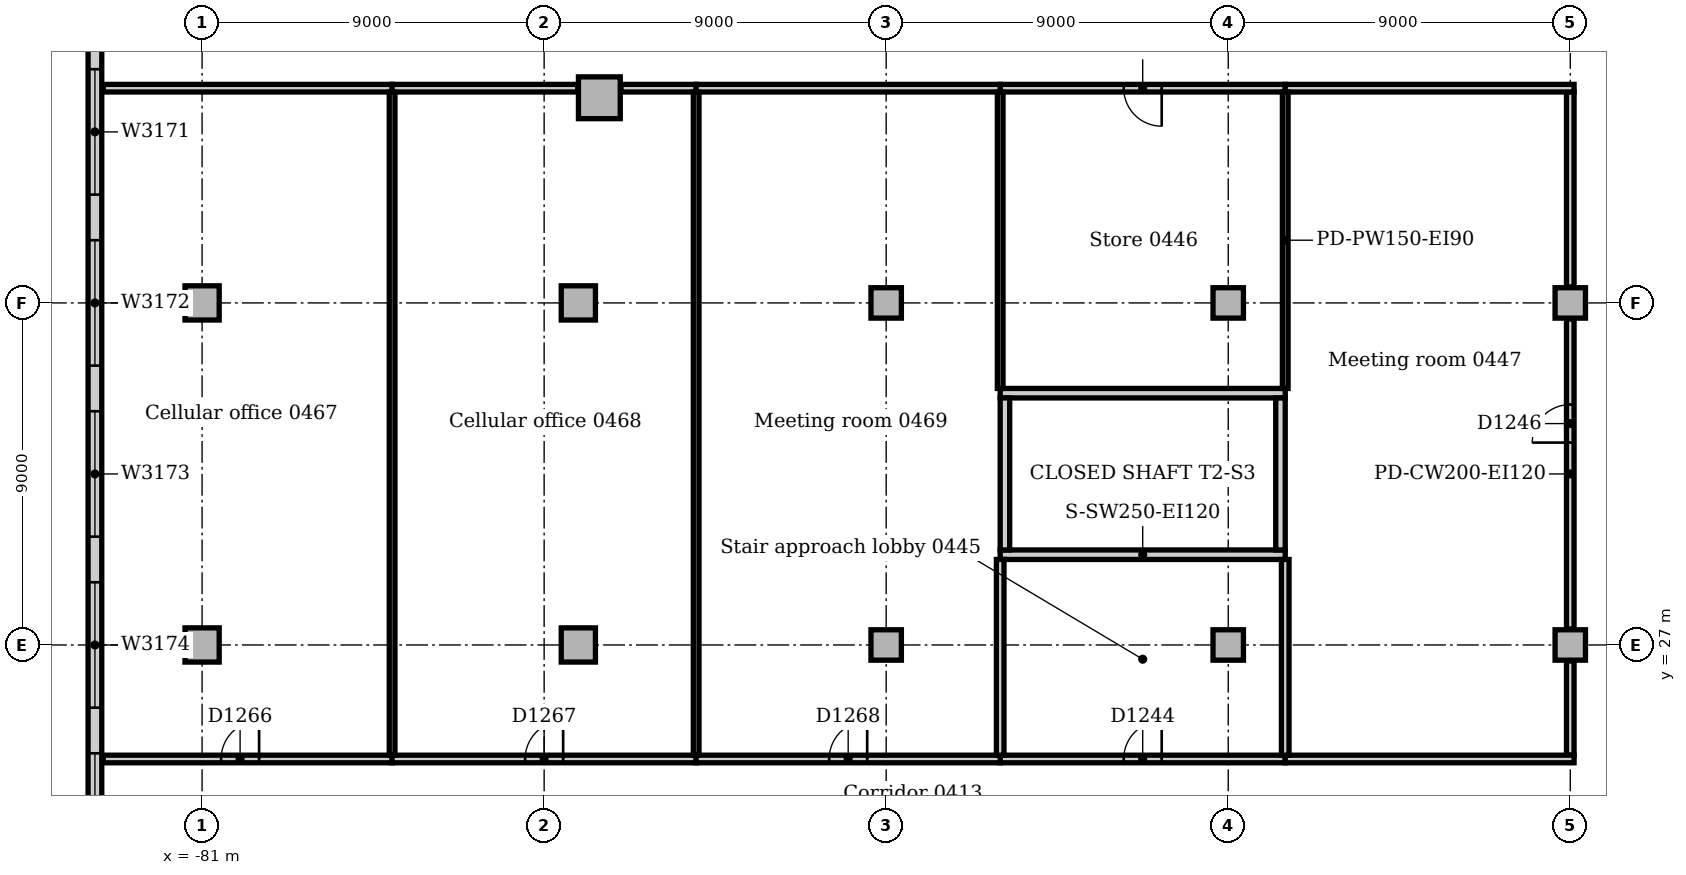
"""IFC4 building model, lengths in metres.
Left out: names, types, materials, properties, quantities, classifications, styles, units other than length and angle.
Written with IfcOpenShell. Run it as: python <this file> out.ifc"""

import sys

from ifc_helpers import new_model, si_unit, direction, frame, frame_2d, origin, origin_2d, place, context, subcontext, project, spatial, rectangle, extrude, element, fill, save


model = new_model("IFC4")
c1 = context("Model", 3, precision=1e-05, world=origin(), true_north=direction((0.0, 1.0)))
c2 = subcontext(c1, "Body", "Model", "MODEL_VIEW")
j1 = project(units=[si_unit("LENGTHUNIT", "METRE"), si_unit("PLANEANGLEUNIT", "RADIAN")], contexts=[c1])
p1 = place(None, origin())
s1 = spatial("IfcSite", under=j1, at=p1, CompositionType="ELEMENT")
p2 = place(p1, origin())
s2 = spatial("IfcBuilding", under=s1, at=p2, CompositionType="ELEMENT")
p3 = place(p2, frame((0.0, 0.0, 21.0)))
s3 = spatial("IfcBuildingStorey", under=s2, at=p3, CompositionType="ELEMENT", Elevation=21.0)
for number, where, z_axis, x_axis in (
    (1, (-60.0, 29.375, 0.0), (0.0, 0.0, 1.0), (1.0, 0.0, 0.0)),
    (2, (-52.5, 33.625, 0.0), (0.0, 0.0, 1.0), (-1.0, 0.0, 0.0)),
):
    element("IfcWall", number, at=place(p3, frame(where, z_axis=z_axis, x_axis=x_axis)), inside=s3, PredefinedType="SOLIDWALL", context=c2, shape_type="SweptSolid", body=[
        extrude(rectangle(XDim=7.5, YDim=0.25, at=frame_2d((3.75, 0.0))), origin(), (0.0, 0.0, 1.0), 5.0),
    ])
for number, where, z_axis, x_axis in (
    (3, (-52.625, 29.5, 0.0), (0.0, 0.0, 1.0), (0.0, 1.0, 0.0)),
    (4, (-59.875, 33.5, 0.0), (0.0, 0.0, 1.0), (0.0, -1.0, 0.0)),
):
    element("IfcWall", number, at=place(p3, frame(where, z_axis=z_axis, x_axis=x_axis)), inside=s3, PredefinedType="SOLIDWALL", context=c2, shape_type="SweptSolid", body=[
        extrude(rectangle(XDim=4.0, YDim=0.25, at=frame_2d((2.0, 0.0))), origin(), (0.0, 0.0, 1.0), 5.0),
    ])
p4 = place(p3, frame((-70.547, 41.398, 0.0), z_axis=(0.0, 0.0, 1.0), x_axis=(1.0, 0.0, 0.0)))
e5 = element("IfcColumn", 5, at=p4, inside=s3, PredefinedType="COLUMN", context=c2, shape_type="SweptSolid", body=[
    extrude(rectangle(XDim=1.1, YDim=1.1, at=origin_2d()), origin(), (0.0, 0.0, 1.0), 4.85),
])
for number, where, z_axis, x_axis in (
    (6, (-71.1, 27.0, 0.0), (0.0, 0.0, 1.0), (1.0, 0.0, 0.0)),
    (7, (-71.1, 36.0, 0.0), (0.0, 0.0, 1.0), (1.0, 0.0, 0.0)),
):
    element("IfcColumn", number, at=place(p3, frame(where, z_axis=z_axis, x_axis=x_axis)), inside=s3, PredefinedType="COLUMN", context=c2, shape_type="SweptSolid", body=[
        extrude(rectangle(XDim=0.9, YDim=0.9, at=origin_2d()), origin(), (0.0, 0.0, 1.0), 4.85),
    ])
for number, where, z_axis, x_axis in (
    (8, (-63.0, 27.0, 0.0), (0.0, 0.0, 1.0), (1.0, 0.0, 0.0)),
    (9, (-63.0, 36.0, 0.0), (0.0, 0.0, 1.0), (1.0, 0.0, 0.0)),
    (10, (-54.0, 27.0, 0.0), (0.0, 0.0, 1.0), (1.0, 0.0, 0.0)),
    (11, (-54.0, 36.0, 0.0), (0.0, 0.0, 1.0), (1.0, 0.0, 0.0)),
    (12, (-45.0, 27.0, 0.0), (0.0, 0.0, 1.0), (1.0, 0.0, 0.0)),
    (13, (-45.0, 36.0, 0.0), (0.0, 0.0, 1.0), (1.0, 0.0, 0.0)),
):
    element("IfcColumn", number, at=place(p3, frame(where, z_axis=z_axis, x_axis=x_axis)), inside=s3, PredefinedType="COLUMN", context=c2, shape_type="SweptSolid", body=[
        extrude(rectangle(XDim=0.8, YDim=0.8, at=origin_2d()), origin(), (0.0, 0.0, 1.0), 4.85),
    ])
for number, where, z_axis, x_axis in (
    (14, (-81.0, 27.0, 0.0), (0.0, 0.0, 1.0), (1.0, 0.0, 0.0)),
    (15, (-81.0, 36.0, 0.0), (0.0, 0.0, 1.0), (1.0, 0.0, 0.0)),
):
    element("IfcColumn", number, at=place(p3, frame(where, z_axis=z_axis, x_axis=x_axis)), inside=s3, PredefinedType="COLUMN", context=c2, shape_type="SweptSolid", body=[
        extrude(rectangle(XDim=0.9, YDim=0.9, at=origin_2d()), origin(), (0.0, 0.0, 1.0), 4.7),
    ])
p5 = place(p3, frame((-83.82, 54.0, 0.0), z_axis=(0.0, 0.0, 1.0), x_axis=(0.0, -1.0, 0.0)))
e16 = element("IfcWall", 16, at=p5, inside=s3, PredefinedType="STANDARD", context=c2, shape_type="SweptSolid", body=[
    extrude(rectangle(XDim=63.0, YDim=0.36, at=frame_2d((31.5, 0.0))), origin(), (0.0, 0.0, 1.0), 4.85),
])
p6 = place(p5, frame((2.85, 0.0, 0.9)))
e17 = element("IfcOpeningElement", 17, at=p6, cuts=e16, PredefinedType="OPENING", context=c2, shape_type="SweptSolid", body=[
    extrude(rectangle(XDim=3.3, YDim=2.4, at=frame_2d((1.65, 1.2))), frame((0.0, 0.19, 0.0), z_axis=(0.0, -1.0, 0.0), x_axis=(1.0, 0.0, 0.0)), (0.0, 0.0, 1.0), 0.38),
])
p7 = place(p5, frame((7.35, 0.0, 0.9)))
e18 = element("IfcOpeningElement", 18, at=p7, cuts=e16, PredefinedType="OPENING", context=c2, shape_type="SweptSolid", body=[
    extrude(rectangle(XDim=3.3, YDim=2.4, at=frame_2d((1.65, 1.2))), frame((0.0, 0.19, 0.0), z_axis=(0.0, -1.0, 0.0), x_axis=(1.0, 0.0, 0.0)), (0.0, 0.0, 1.0), 0.38),
])
p8 = place(p5, frame((11.85, 0.0, 0.9)))
e19 = element("IfcOpeningElement", 19, at=p8, cuts=e16, PredefinedType="OPENING", context=c2, shape_type="SweptSolid", body=[
    extrude(rectangle(XDim=3.3, YDim=2.4, at=frame_2d((1.65, 1.2))), frame((0.0, 0.19, 0.0), z_axis=(0.0, -1.0, 0.0), x_axis=(1.0, 0.0, 0.0)), (0.0, 0.0, 1.0), 0.38),
])
p9 = place(p5, frame((16.35, 0.0, 0.9)))
e20 = element("IfcOpeningElement", 20, at=p9, cuts=e16, PredefinedType="OPENING", context=c2, shape_type="SweptSolid", body=[
    extrude(rectangle(XDim=3.3, YDim=2.4, at=frame_2d((1.65, 1.2))), frame((0.0, 0.19, 0.0), z_axis=(0.0, -1.0, 0.0), x_axis=(1.0, 0.0, 0.0)), (0.0, 0.0, 1.0), 0.38),
])
p10 = place(p5, frame((20.85, 0.0, 0.9)))
e21 = element("IfcOpeningElement", 21, at=p10, cuts=e16, PredefinedType="OPENING", context=c2, shape_type="SweptSolid", body=[
    extrude(rectangle(XDim=3.3, YDim=2.4, at=frame_2d((1.65, 1.2))), frame((0.0, 0.19, 0.0), z_axis=(0.0, -1.0, 0.0), x_axis=(1.0, 0.0, 0.0)), (0.0, 0.0, 1.0), 0.38),
])
p11 = place(p5, frame((25.35, 0.0, 0.9)))
e22 = element("IfcOpeningElement", 22, at=p11, cuts=e16, PredefinedType="OPENING", context=c2, shape_type="SweptSolid", body=[
    extrude(rectangle(XDim=3.3, YDim=2.4, at=frame_2d((1.65, 1.2))), frame((0.0, 0.19, 0.0), z_axis=(0.0, -1.0, 0.0), x_axis=(1.0, 0.0, 0.0)), (0.0, 0.0, 1.0), 0.38),
])
p12 = place(p5, frame((29.85, 0.0, 0.9)))
e23 = element("IfcOpeningElement", 23, at=p12, cuts=e16, PredefinedType="OPENING", context=c2, shape_type="SweptSolid", body=[
    extrude(rectangle(XDim=3.3, YDim=2.4, at=frame_2d((1.65, 1.2))), frame((0.0, 0.19, 0.0), z_axis=(0.0, -1.0, 0.0), x_axis=(1.0, 0.0, 0.0)), (0.0, 0.0, 1.0), 0.38),
])
p13 = place(p5, frame((34.35, 0.0, 0.9)))
e24 = element("IfcOpeningElement", 24, at=p13, cuts=e16, PredefinedType="OPENING", context=c2, shape_type="SweptSolid", body=[
    extrude(rectangle(XDim=3.3, YDim=2.4, at=frame_2d((1.65, 1.2))), frame((0.0, 0.19, 0.0), z_axis=(0.0, -1.0, 0.0), x_axis=(1.0, 0.0, 0.0)), (0.0, 0.0, 1.0), 0.38),
])
p14 = place(p5, frame((38.85, 0.0, 0.9)))
e25 = element("IfcOpeningElement", 25, at=p14, cuts=e16, PredefinedType="OPENING", context=c2, shape_type="SweptSolid", body=[
    extrude(rectangle(XDim=3.3, YDim=2.4, at=frame_2d((1.65, 1.2))), frame((0.0, 0.19, 0.0), z_axis=(0.0, -1.0, 0.0), x_axis=(1.0, 0.0, 0.0)), (0.0, 0.0, 1.0), 0.38),
])
p15 = place(p5, frame((43.35, 0.0, 0.9)))
e26 = element("IfcOpeningElement", 26, at=p15, cuts=e16, PredefinedType="OPENING", context=c2, shape_type="SweptSolid", body=[
    extrude(rectangle(XDim=3.3, YDim=2.4, at=frame_2d((1.65, 1.2))), frame((0.0, 0.19, 0.0), z_axis=(0.0, -1.0, 0.0), x_axis=(1.0, 0.0, 0.0)), (0.0, 0.0, 1.0), 0.38),
])
p16 = place(p5, frame((47.85, 0.0, 0.9)))
e27 = element("IfcOpeningElement", 27, at=p16, cuts=e16, PredefinedType="OPENING", context=c2, shape_type="SweptSolid", body=[
    extrude(rectangle(XDim=3.3, YDim=2.4, at=frame_2d((1.65, 1.2))), frame((0.0, 0.19, 0.0), z_axis=(0.0, -1.0, 0.0), x_axis=(1.0, 0.0, 0.0)), (0.0, 0.0, 1.0), 0.38),
])
p17 = place(p5, frame((52.35, 0.0, 0.9)))
e28 = element("IfcOpeningElement", 28, at=p17, cuts=e16, PredefinedType="OPENING", context=c2, shape_type="SweptSolid", body=[
    extrude(rectangle(XDim=3.3, YDim=2.4, at=frame_2d((1.65, 1.2))), frame((0.0, 0.19, 0.0), z_axis=(0.0, -1.0, 0.0), x_axis=(1.0, 0.0, 0.0)), (0.0, 0.0, 1.0), 0.38),
])
p18 = place(p5, frame((56.85, 0.0, 0.9)))
e29 = element("IfcOpeningElement", 29, at=p18, cuts=e16, PredefinedType="OPENING", context=c2, shape_type="SweptSolid", body=[
    extrude(rectangle(XDim=3.3, YDim=2.4, at=frame_2d((1.65, 1.2))), frame((0.0, 0.19, 0.0), z_axis=(0.0, -1.0, 0.0), x_axis=(1.0, 0.0, 0.0)), (0.0, 0.0, 1.0), 0.38),
])
p19 = place(p3, frame((-45.0, 24.1, 0.0), z_axis=(0.0, 0.0, 1.0), x_axis=(0.0, 1.0, 0.0)))
e30 = element("IfcWall", 30, at=p19, inside=s3, PredefinedType="PARTITIONING", context=c2, shape_type="SweptSolid", body=[
    extrude(rectangle(XDim=2.48, YDim=0.2, at=frame_2d((1.24, 0.0))), origin(), (0.0, 0.0, 1.0), 4.158),
])
p20 = place(p3, frame((-45.0, 27.42, 0.0), z_axis=(0.0, 0.0, 1.0), x_axis=(0.0, 1.0, 0.0)))
e31 = element("IfcWall", 31, at=p20, inside=s3, PredefinedType="PARTITIONING", context=c2, shape_type="SweptSolid", body=[
    extrude(rectangle(XDim=8.16, YDim=0.2, at=frame_2d((4.08, 0.0))), origin(), (0.0, 0.0, 1.0), 4.158),
])
p21 = place(p20, frame((4.905, 0.0, 0.0)))
e32 = element("IfcOpeningElement", 32, at=p21, cuts=e31, PredefinedType="OPENING", context=c2, shape_type="SweptSolid", body=[
    extrude(rectangle(XDim=1.0, YDim=2.1, at=frame_2d((0.5, 1.05))), frame((0.0, 0.11, 0.0), z_axis=(0.0, -1.0, 0.0), x_axis=(1.0, 0.0, 0.0)), (0.0, 0.0, 1.0), 0.22),
])
p22 = place(p3, frame((-45.0, 36.42, 0.0), z_axis=(0.0, 0.0, 1.0), x_axis=(0.0, 1.0, 0.0)))
e33 = element("IfcWall", 33, at=p22, inside=s3, PredefinedType="PARTITIONING", context=c2, shape_type="SweptSolid", body=[
    extrude(rectangle(XDim=5.13, YDim=0.2, at=frame_2d((2.565, 0.0))), origin(), (0.0, 0.0, 1.0), 4.158),
])
p23 = place(p3, frame((-60.0, 24.0, 0.0), z_axis=(0.0, 0.0, 1.0), x_axis=(1.0, 0.0, 0.0)))
e34 = element("IfcWall", 34, at=p23, inside=s3, PredefinedType="PARTITIONING", context=c2, shape_type="SweptSolid", body=[
    extrude(rectangle(XDim=7.5, YDim=0.2, at=frame_2d((3.75, 0.0))), origin(), (0.0, 0.0, 1.0), 4.85),
])
p24 = place(p23, frame((3.25, 0.0, 0.0)))
e35 = element("IfcOpeningElement", 35, at=p24, cuts=e34, PredefinedType="OPENING", context=c2, shape_type="SweptSolid", body=[
    extrude(rectangle(XDim=1.0, YDim=2.1, at=frame_2d((0.5, 1.05))), frame((0.0, 0.11, 0.0), z_axis=(0.0, -1.0, 0.0), x_axis=(1.0, 0.0, 0.0)), (0.0, 0.0, 1.0), 0.22),
])
p25 = place(p3, frame((-52.5, 24.0, 0.0), z_axis=(0.0, 0.0, 1.0), x_axis=(1.0, 0.0, 0.0)))
e36 = element("IfcWall", 36, at=p25, inside=s3, PredefinedType="PARTITIONING", context=c2, shape_type="SweptSolid", body=[
    extrude(rectangle(XDim=7.6, YDim=0.2, at=frame_2d((3.8, 0.0))), origin(), (0.0, 0.0, 1.0), 4.85),
])
p26 = place(p3, frame((-83.6, 24.0, 0.0), z_axis=(0.0, 0.0, 1.0), x_axis=(1.0, 0.0, 0.0)))
e37 = element("IfcWall", 37, at=p26, inside=s3, PredefinedType="PARTITIONING", context=c2, shape_type="SweptSolid", body=[
    extrude(rectangle(XDim=7.6, YDim=0.2, at=frame_2d((3.8, 0.0))), origin(), (0.0, 0.0, 1.0), 4.7),
])
p27 = place(p26, frame((3.1, 0.0, 0.0)))
e38 = element("IfcOpeningElement", 38, at=p27, cuts=e37, PredefinedType="OPENING", context=c2, shape_type="SweptSolid", body=[
    extrude(rectangle(XDim=1.0, YDim=2.1, at=frame_2d((0.5, 1.05))), frame((0.0, 0.11, 0.0), z_axis=(0.0, -1.0, 0.0), x_axis=(1.0, 0.0, 0.0)), (0.0, 0.0, 1.0), 0.22),
])
p28 = place(p3, frame((-76.0, 24.0, 0.0), z_axis=(0.0, 0.0, 1.0), x_axis=(1.0, 0.0, 0.0)))
e39 = element("IfcWall", 39, at=p28, inside=s3, PredefinedType="PARTITIONING", context=c2, shape_type="SweptSolid", body=[
    extrude(rectangle(XDim=8.0, YDim=0.2, at=frame_2d((4.0, 0.0))), origin(), (0.0, 0.0, 1.0), 4.7),
])
p29 = place(p28, frame((3.5, 0.0, 0.0)))
e40 = element("IfcOpeningElement", 40, at=p29, cuts=e39, PredefinedType="OPENING", context=c2, shape_type="SweptSolid", body=[
    extrude(rectangle(XDim=1.0, YDim=2.1, at=frame_2d((0.5, 1.05))), frame((0.0, 0.11, 0.0), z_axis=(0.0, -1.0, 0.0), x_axis=(1.0, 0.0, 0.0)), (0.0, 0.0, 1.0), 0.22),
])
p30 = place(p3, frame((-68.0, 24.0, 0.0), z_axis=(0.0, 0.0, 1.0), x_axis=(1.0, 0.0, 0.0)))
e41 = element("IfcWall", 41, at=p30, inside=s3, PredefinedType="PARTITIONING", context=c2, shape_type="SweptSolid", body=[
    extrude(rectangle(XDim=8.0, YDim=0.2, at=frame_2d((4.0, 0.0))), origin(), (0.0, 0.0, 1.0), 4.85),
])
p31 = place(p30, frame((3.5, 0.0, 0.0)))
e42 = element("IfcOpeningElement", 42, at=p31, cuts=e41, PredefinedType="OPENING", context=c2, shape_type="SweptSolid", body=[
    extrude(rectangle(XDim=1.0, YDim=2.1, at=frame_2d((0.5, 1.05))), frame((0.0, 0.11, 0.0), z_axis=(0.0, -1.0, 0.0), x_axis=(1.0, 0.0, 0.0)), (0.0, 0.0, 1.0), 0.22),
])
p32 = place(p3, frame((-60.0, 41.65, 0.0), z_axis=(0.0, 0.0, 1.0), x_axis=(1.0, 0.0, 0.0)))
e43 = element("IfcWall", 43, at=p32, inside=s3, PredefinedType="PARTITIONING", context=c2, shape_type="SweptSolid", body=[
    extrude(rectangle(XDim=7.5, YDim=0.2, at=frame_2d((3.75, 0.0))), origin(), (0.0, 0.0, 1.0), 4.85),
])
p33 = place(p32, frame((3.25, 0.0, 0.0)))
e44 = element("IfcOpeningElement", 44, at=p33, cuts=e43, PredefinedType="OPENING", context=c2, shape_type="SweptSolid", body=[
    extrude(rectangle(XDim=1.0, YDim=2.1, at=frame_2d((0.5, 1.05))), frame((0.0, 0.11, 0.0), z_axis=(0.0, -1.0, 0.0), x_axis=(1.0, 0.0, 0.0)), (0.0, 0.0, 1.0), 0.22),
])
p34 = place(p3, frame((-52.5, 41.65, 0.0), z_axis=(0.0, 0.0, 1.0), x_axis=(1.0, 0.0, 0.0)))
e45 = element("IfcWall", 45, at=p34, inside=s3, PredefinedType="PARTITIONING", context=c2, shape_type="SweptSolid", body=[
    extrude(rectangle(XDim=7.6, YDim=0.2, at=frame_2d((3.8, 0.0))), origin(), (0.0, 0.0, 1.0), 4.85),
])
p35 = place(p3, frame((-83.6, 41.65, 0.0), z_axis=(0.0, 0.0, 1.0), x_axis=(1.0, 0.0, 0.0)))
e46 = element("IfcWall", 46, at=p35, inside=s3, PredefinedType="PARTITIONING", context=c2, shape_type="SweptSolid", body=[
    extrude(rectangle(XDim=7.6, YDim=0.2, at=frame_2d((3.8, 0.0))), origin(), (0.0, 0.0, 1.0), 4.7),
])
p36 = place(p3, frame((-76.0, 41.65, 0.0), z_axis=(0.0, 0.0, 1.0), x_axis=(1.0, 0.0, 0.0)))
e47 = element("IfcWall", 47, at=p36, inside=s3, PredefinedType="PARTITIONING", context=c2, shape_type="SweptSolid", body=[
    extrude(rectangle(XDim=4.883, YDim=0.2, at=frame_2d((2.442, 0.0))), origin(), (0.0, 0.0, 1.0), 4.7),
])
p37 = place(p3, frame((-69.977, 41.65, 0.0), z_axis=(0.0, 0.0, 1.0), x_axis=(1.0, 0.0, 0.0)))
e48 = element("IfcWall", 48, at=p37, inside=s3, PredefinedType="PARTITIONING", context=c2, shape_type="SweptSolid", body=[
    extrude(rectangle(XDim=1.977, YDim=0.2, at=frame_2d((0.989, 0.0))), origin(), (0.0, 0.0, 1.0), 4.85),
])
p38 = place(p3, frame((-68.0, 41.65, 0.0), z_axis=(0.0, 0.0, 1.0), x_axis=(1.0, 0.0, 0.0)))
e49 = element("IfcWall", 49, at=p38, inside=s3, PredefinedType="PARTITIONING", context=c2, shape_type="SweptSolid", body=[
    extrude(rectangle(XDim=8.0, YDim=0.2, at=frame_2d((4.0, 0.0))), origin(), (0.0, 0.0, 1.0), 4.85),
])
for number, where, z_axis, x_axis in (
    (50, (-52.5, 24.1, 0.0), (0.0, 0.0, 1.0), (0.0, 1.0, 0.0)),
    (51, (-60.0, 24.1, 0.0), (0.0, 0.0, 1.0), (0.0, 1.0, 0.0)),
):
    element("IfcWall", number, at=place(p3, frame(where, z_axis=z_axis, x_axis=x_axis)), inside=s3, PredefinedType="PARTITIONING", context=c2, shape_type="SweptSolid", body=[
        extrude(rectangle(XDim=5.15, YDim=0.2, at=frame_2d((2.575, 0.0))), origin(), (0.0, 0.0, 1.0), 4.85),
    ])
for number, where, z_axis, x_axis in (
    (52, (-52.5, 33.75, 0.0), (0.0, 0.0, 1.0), (0.0, 1.0, 0.0)),
    (53, (-60.0, 33.75, 0.0), (0.0, 0.0, 1.0), (0.0, 1.0, 0.0)),
):
    element("IfcWall", number, at=place(p3, frame(where, z_axis=z_axis, x_axis=x_axis)), inside=s3, PredefinedType="PARTITIONING", context=c2, shape_type="SweptSolid", body=[
        extrude(rectangle(XDim=7.8, YDim=0.15, at=frame_2d((3.9, 0.0))), origin(), (0.0, 0.0, 1.0), 4.85),
    ])
p39 = place(p3, frame((-76.0, 24.1, 0.0), z_axis=(0.0, 0.0, 1.0), x_axis=(0.0, 1.0, 0.0)))
e54 = element("IfcWall", 54, at=p39, inside=s3, PredefinedType="PARTITIONING", context=c2, shape_type="SweptSolid", body=[
    extrude(rectangle(XDim=17.45, YDim=0.15, at=frame_2d((8.725, 0.0))), origin(), (0.0, 0.0, 1.0), 4.7),
])
p40 = place(p3, frame((-68.0, 24.1, 0.0), z_axis=(0.0, 0.0, 1.0), x_axis=(0.0, 1.0, 0.0)))
e55 = element("IfcWall", 55, at=p40, inside=s3, PredefinedType="PARTITIONING", context=c2, shape_type="SweptSolid", body=[
    extrude(rectangle(XDim=17.45, YDim=0.15, at=frame_2d((8.725, 0.0))), origin(), (0.0, 0.0, 1.0), 4.85),
])
p41 = place(p8, origin())
e56 = element("IfcWindow", 56, at=p41, inside=s3, PartitioningType="SINGLE_PANEL", PredefinedType="WINDOW", context=c2, shape_type="SweptSolid", body=[
    extrude(rectangle(XDim=3.3, YDim=2.4, at=frame_2d((1.65, 1.2))), frame((0.0, 0.13, 0.0), z_axis=(0.0, -1.0, 0.0), x_axis=(1.0, 0.0, 0.0)), (0.0, 0.0, 1.0), 0.06),
])
fill(e19, e56)
p42 = place(p9, origin())
e57 = element("IfcWindow", 57, at=p42, inside=s3, PartitioningType="SINGLE_PANEL", PredefinedType="WINDOW", context=c2, shape_type="SweptSolid", body=[
    extrude(rectangle(XDim=3.3, YDim=2.4, at=frame_2d((1.65, 1.2))), frame((0.0, 0.13, 0.0), z_axis=(0.0, -1.0, 0.0), x_axis=(1.0, 0.0, 0.0)), (0.0, 0.0, 1.0), 0.06),
])
fill(e20, e57)
p43 = place(p10, origin())
e58 = element("IfcWindow", 58, at=p43, inside=s3, PartitioningType="SINGLE_PANEL", PredefinedType="WINDOW", context=c2, shape_type="SweptSolid", body=[
    extrude(rectangle(XDim=3.3, YDim=2.4, at=frame_2d((1.65, 1.2))), frame((0.0, 0.13, 0.0), z_axis=(0.0, -1.0, 0.0), x_axis=(1.0, 0.0, 0.0)), (0.0, 0.0, 1.0), 0.06),
])
fill(e21, e58)
p44 = place(p11, origin())
e59 = element("IfcWindow", 59, at=p44, inside=s3, PartitioningType="SINGLE_PANEL", PredefinedType="WINDOW", context=c2, shape_type="SweptSolid", body=[
    extrude(rectangle(XDim=3.3, YDim=2.4, at=frame_2d((1.65, 1.2))), frame((0.0, 0.13, 0.0), z_axis=(0.0, -1.0, 0.0), x_axis=(1.0, 0.0, 0.0)), (0.0, 0.0, 1.0), 0.06),
])
fill(e22, e59)
p45 = place(p12, origin())
e60 = element("IfcWindow", 60, at=p45, inside=s3, PartitioningType="SINGLE_PANEL", PredefinedType="WINDOW", context=c2, shape_type="SweptSolid", body=[
    extrude(rectangle(XDim=3.3, YDim=2.4, at=frame_2d((1.65, 1.2))), frame((0.0, 0.13, 0.0), z_axis=(0.0, -1.0, 0.0), x_axis=(1.0, 0.0, 0.0)), (0.0, 0.0, 1.0), 0.06),
])
fill(e23, e60)
p46 = place(p24, origin())
e61 = element("IfcDoor", 61, at=p46, inside=s3, OperationType="SINGLE_SWING_RIGHT", PredefinedType="DOOR", context=c2, shape_type="SweptSolid", body=[
    extrude(rectangle(XDim=1.0, YDim=2.1, at=frame_2d((0.5, 1.05))), frame((0.0, 0.025, 0.0), z_axis=(0.0, -1.0, 0.0), x_axis=(1.0, 0.0, 0.0)), (0.0, 0.0, 1.0), 0.05),
])
fill(e35, e61)
p47 = place(p33, frame((1.0, 0.0, 0.0), z_axis=(0.0, 0.0, 1.0), x_axis=(-1.0, 0.0, 0.0)))
e62 = element("IfcDoor", 62, at=p47, inside=s3, OperationType="SINGLE_SWING_LEFT", PredefinedType="DOOR", context=c2, shape_type="SweptSolid", body=[
    extrude(rectangle(XDim=1.0, YDim=2.1, at=frame_2d((0.5, 1.05))), frame((0.0, 0.025, 0.0), z_axis=(0.0, -1.0, 0.0), x_axis=(1.0, 0.0, 0.0)), (0.0, 0.0, 1.0), 0.05),
])
fill(e44, e62)
p48 = place(p21, origin())
e63 = element("IfcDoor", 63, at=p48, inside=s3, OperationType="SINGLE_SWING_LEFT", PredefinedType="DOOR", context=c2, shape_type="SweptSolid", body=[
    extrude(rectangle(XDim=1.0, YDim=2.1, at=frame_2d((0.5, 1.05))), frame((0.0, 0.025, 0.0), z_axis=(0.0, -1.0, 0.0), x_axis=(1.0, 0.0, 0.0)), (0.0, 0.0, 1.0), 0.05),
])
fill(e32, e63)
p49 = place(p27, origin())
e64 = element("IfcDoor", 64, at=p49, inside=s3, OperationType="SINGLE_SWING_RIGHT", PredefinedType="DOOR", context=c2, shape_type="SweptSolid", body=[
    extrude(rectangle(XDim=1.0, YDim=2.1, at=frame_2d((0.5, 1.05))), frame((0.0, 0.025, 0.0), z_axis=(0.0, -1.0, 0.0), x_axis=(1.0, 0.0, 0.0)), (0.0, 0.0, 1.0), 0.05),
])
fill(e38, e64)
p50 = place(p29, origin())
e65 = element("IfcDoor", 65, at=p50, inside=s3, OperationType="SINGLE_SWING_RIGHT", PredefinedType="DOOR", context=c2, shape_type="SweptSolid", body=[
    extrude(rectangle(XDim=1.0, YDim=2.1, at=frame_2d((0.5, 1.05))), frame((0.0, 0.025, 0.0), z_axis=(0.0, -1.0, 0.0), x_axis=(1.0, 0.0, 0.0)), (0.0, 0.0, 1.0), 0.05),
])
fill(e40, e65)
p51 = place(p31, origin())
e66 = element("IfcDoor", 66, at=p51, inside=s3, OperationType="SINGLE_SWING_RIGHT", PredefinedType="DOOR", context=c2, shape_type="SweptSolid", body=[
    extrude(rectangle(XDim=1.0, YDim=2.1, at=frame_2d((0.5, 1.05))), frame((0.0, 0.025, 0.0), z_axis=(0.0, -1.0, 0.0), x_axis=(1.0, 0.0, 0.0)), (0.0, 0.0, 1.0), 0.05),
])
fill(e42, e66)
save(model, sys.argv[1])
